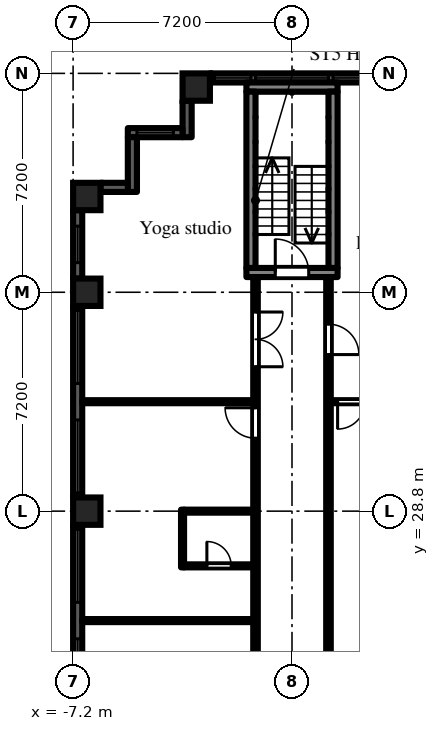
"""IFC4 building model, lengths in metres.
Left out: names, types, materials, properties, quantities, classifications, styles, units other than length and angle.
Written with IfcOpenShell. Run it as: python <this file> out.ifc"""

import sys

from ifc_helpers import new_model, si_unit, direction, frame, frame_2d, origin, origin_2d, place, context, subcontext, project, spatial, rectangle, extrude, element, fill, save


model = new_model("IFC4")
c1 = context("Model", 3, precision=1e-05, world=origin(), true_north=direction((0.0, 1.0)))
c2 = subcontext(c1, "Body", "Model", "MODEL_VIEW")
j1 = project(units=[si_unit("LENGTHUNIT", "METRE"), si_unit("PLANEANGLEUNIT", "RADIAN")], contexts=[c1])
p1 = place(None, origin())
s1 = spatial("IfcSite", under=j1, at=p1, CompositionType="ELEMENT")
p2 = place(p1, origin())
s2 = spatial("IfcBuilding", under=s1, at=p2, CompositionType="ELEMENT")
p3 = place(p2, frame((0.0, 0.0, 53.7)))
s3 = spatial("IfcBuildingStorey", under=s2, at=p3, CompositionType="ELEMENT", Elevation=53.7)
for number, where, z_axis, x_axis in (
    (1, (-6.75, 28.8, 0.0), (0.0, 0.0, 1.0), (1.0, 0.0, 0.0)),
    (2, (-6.75, 36.0, 0.0), (0.0, 0.0, 1.0), (1.0, 0.0, 0.0)),
    (3, (-6.75, 39.15, 0.0), (0.0, 0.0, 1.0), (1.0, 0.0, 0.0)),
    (4, (-3.15, 42.75, 0.0), (0.0, 0.0, 1.0), (1.0, 0.0, 0.0)),
):
    element("IfcColumn", number, at=place(p3, frame(where, z_axis=z_axis, x_axis=x_axis)), inside=s3, PredefinedType="COLUMN", context=c2, shape_type="SweptSolid", body=[
        extrude(rectangle(XDim=0.9, YDim=0.9, at=origin_2d()), origin(), (0.0, 0.0, 1.0), 3.0),
    ])
p4 = place(p3, frame((2.7, 43.05, 0.0), z_axis=(0.0, 0.0, 1.0), x_axis=(-1.0, 0.0, 0.0)))
e5 = element("IfcWall", 5, at=p4, inside=s3, PredefinedType="SOLIDWALL", context=c2, shape_type="SweptSolid", body=[
    extrude(rectangle(XDim=5.4, YDim=0.3, at=frame_2d((2.7, 0.0))), origin(), (0.0, 0.0, 1.0), 2.1),
])
p5 = place(p4, frame((1.5, 0.0, 0.2)))
e6 = element("IfcOpeningElement", 6, at=p5, cuts=e5, PredefinedType="OPENING", context=c2, shape_type="SweptSolid", body=[
    extrude(rectangle(XDim=2.4, YDim=1.85, at=frame_2d((1.2, 0.925))), frame((0.0, 0.16, 0.0), z_axis=(0.0, -1.0, 0.0), x_axis=(1.0, 0.0, 0.0)), (0.0, 0.0, 1.0), 0.32),
])
p6 = place(p4, frame((0.15, 0.0, 0.2)))
e7 = element("IfcOpeningElement", 7, at=p6, cuts=e5, PredefinedType="OPENING", context=c2, shape_type="SweptSolid", body=[
    extrude(rectangle(XDim=1.2, YDim=1.85, at=frame_2d((0.6, 0.925))), frame((0.0, 0.16, 0.0), z_axis=(0.0, -1.0, 0.0), x_axis=(1.0, 0.0, 0.0)), (0.0, 0.0, 1.0), 0.32),
])
p7 = place(p4, frame((4.05, 0.0, 0.2)))
e8 = element("IfcOpeningElement", 8, at=p7, cuts=e5, PredefinedType="OPENING", context=c2, shape_type="SweptSolid", body=[
    extrude(rectangle(XDim=1.2, YDim=1.85, at=frame_2d((0.6, 0.925))), frame((0.0, 0.16, 0.0), z_axis=(0.0, -1.0, 0.0), x_axis=(1.0, 0.0, 0.0)), (0.0, 0.0, 1.0), 0.32),
])
p8 = place(p3, frame((-3.45, 42.3, 0.0), z_axis=(0.0, 0.0, 1.0), x_axis=(0.0, -1.0, 0.0)))
e9 = element("IfcWall", 9, at=p8, inside=s3, PredefinedType="SOLIDWALL", context=c2, shape_type="SweptSolid", body=[
    extrude(rectangle(XDim=1.2, YDim=0.3, at=frame_2d((0.6, 0.0))), origin(), (0.0, 0.0, 1.0), 2.575),
])
p9 = place(p3, frame((-3.6, 41.25, 0.0), z_axis=(0.0, 0.0, 1.0), x_axis=(-1.0, 0.0, 0.0)))
e10 = element("IfcWall", 10, at=p9, inside=s3, PredefinedType="SOLIDWALL", context=c2, shape_type="SweptSolid", body=[
    extrude(rectangle(XDim=1.8, YDim=0.3, at=frame_2d((0.9, 0.0))), origin(), (0.0, 0.0, 1.0), 2.575),
])
p10 = place(p9, frame((0.3, 0.0, 0.2)))
e11 = element("IfcOpeningElement", 11, at=p10, cuts=e10, PredefinedType="OPENING", context=c2, shape_type="SweptSolid", body=[
    extrude(rectangle(XDim=1.2, YDim=1.85, at=frame_2d((0.6, 0.925))), frame((0.0, 0.16, 0.0), z_axis=(0.0, -1.0, 0.0), x_axis=(1.0, 0.0, 0.0)), (0.0, 0.0, 1.0), 0.32),
])
p11 = place(p3, frame((-5.25, 41.1, 0.0), z_axis=(0.0, 0.0, 1.0), x_axis=(0.0, -1.0, 0.0)))
e12 = element("IfcWall", 12, at=p11, inside=s3, PredefinedType="SOLIDWALL", context=c2, shape_type="SweptSolid", body=[
    extrude(rectangle(XDim=1.8, YDim=0.3, at=frame_2d((0.9, 0.0))), origin(), (0.0, 0.0, 1.0), 2.575),
])
p12 = place(p3, frame((-5.4, 39.45, 0.0), z_axis=(0.0, 0.0, 1.0), x_axis=(-1.0, 0.0, 0.0)))
e13 = element("IfcWall", 13, at=p12, inside=s3, PredefinedType="SOLIDWALL", context=c2, shape_type="SweptSolid", body=[
    extrude(rectangle(XDim=0.9, YDim=0.3, at=frame_2d((0.45, 0.0))), origin(), (0.0, 0.0, 1.0), 2.575),
])
p13 = place(p3, frame((-7.05, 38.7, 0.0), z_axis=(0.0, 0.0, 1.0), x_axis=(0.0, -1.0, 0.0)))
e14 = element("IfcWall", 14, at=p13, inside=s3, PredefinedType="SOLIDWALL", context=c2, shape_type="SweptSolid", body=[
    extrude(rectangle(XDim=2.25, YDim=0.3, at=frame_2d((1.125, 0.0))), origin(), (0.0, 0.0, 1.0), 2.1),
])
p14 = place(p13, frame((0.525, 0.0, 0.2)))
e15 = element("IfcOpeningElement", 15, at=p14, cuts=e14, PredefinedType="OPENING", context=c2, shape_type="SweptSolid", body=[
    extrude(rectangle(XDim=1.2, YDim=1.85, at=frame_2d((0.6, 0.925))), frame((0.0, 0.16, 0.0), z_axis=(0.0, -1.0, 0.0), x_axis=(1.0, 0.0, 0.0)), (0.0, 0.0, 1.0), 0.32),
])
p15 = place(p3, frame((-7.05, 35.55, 0.0), z_axis=(0.0, 0.0, 1.0), x_axis=(0.0, -1.0, 0.0)))
e16 = element("IfcWall", 16, at=p15, inside=s3, PredefinedType="SOLIDWALL", context=c2, shape_type="SweptSolid", body=[
    extrude(rectangle(XDim=6.3, YDim=0.3, at=frame_2d((3.15, 0.0))), origin(), (0.0, 0.0, 1.0), 2.1),
])
p16 = place(p15, frame((0.15, 0.0, 0.2)))
e17 = element("IfcOpeningElement", 17, at=p16, cuts=e16, PredefinedType="OPENING", context=c2, shape_type="SweptSolid", body=[
    extrude(rectangle(XDim=2.4, YDim=1.85, at=frame_2d((1.2, 0.925))), frame((0.0, 0.16, 0.0), z_axis=(0.0, -1.0, 0.0), x_axis=(1.0, 0.0, 0.0)), (0.0, 0.0, 1.0), 0.32),
])
p17 = place(p15, frame((3.75, 0.0, 0.2)))
e18 = element("IfcOpeningElement", 18, at=p17, cuts=e16, PredefinedType="OPENING", context=c2, shape_type="SweptSolid", body=[
    extrude(rectangle(XDim=2.4, YDim=1.85, at=frame_2d((1.2, 0.925))), frame((0.0, 0.16, 0.0), z_axis=(0.0, -1.0, 0.0), x_axis=(1.0, 0.0, 0.0)), (0.0, 0.0, 1.0), 0.32),
])
p18 = place(p3, frame((-7.05, 28.35, 0.0), z_axis=(0.0, 0.0, 1.0), x_axis=(0.0, -1.0, 0.0)))
e19 = element("IfcWall", 19, at=p18, inside=s3, PredefinedType="SOLIDWALL", context=c2, shape_type="SweptSolid", body=[
    extrude(rectangle(XDim=6.3, YDim=0.3, at=frame_2d((3.15, 0.0))), origin(), (0.0, 0.0, 1.0), 2.1),
])
p19 = place(p18, frame((0.15, 0.0, 0.2)))
e20 = element("IfcOpeningElement", 20, at=p19, cuts=e19, PredefinedType="OPENING", context=c2, shape_type="SweptSolid", body=[
    extrude(rectangle(XDim=2.4, YDim=1.85, at=frame_2d((1.2, 0.925))), frame((0.0, 0.16, 0.0), z_axis=(0.0, -1.0, 0.0), x_axis=(1.0, 0.0, 0.0)), (0.0, 0.0, 1.0), 0.32),
])
p20 = place(p18, frame((3.75, 0.0, 0.2)))
e21 = element("IfcOpeningElement", 21, at=p20, cuts=e19, PredefinedType="OPENING", context=c2, shape_type="SweptSolid", body=[
    extrude(rectangle(XDim=2.4, YDim=1.85, at=frame_2d((1.2, 0.925))), frame((0.0, 0.16, 0.0), z_axis=(0.0, -1.0, 0.0), x_axis=(1.0, 0.0, 0.0)), (0.0, 0.0, 1.0), 0.32),
])
p21 = place(p3, frame((-1.5, 36.65, 0.0), z_axis=(0.0, 0.0, 1.0), x_axis=(1.0, 0.0, 0.0)))
e22 = element("IfcWall", 22, at=p21, inside=s3, PredefinedType="SHEAR", context=c2, shape_type="SweptSolid", body=[
    extrude(rectangle(XDim=3.0, YDim=0.3, at=frame_2d((1.5, 0.0))), origin(), (0.0, 0.0, 1.0), 2.575),
])
p22 = place(p21, frame((0.95, 0.0, 0.0)))
e23 = element("IfcOpeningElement", 23, at=p22, cuts=e22, PredefinedType="OPENING", context=c2, shape_type="SweptSolid", body=[
    extrude(rectangle(XDim=1.1, YDim=2.1, at=frame_2d((0.55, 1.05))), frame((0.0, 0.16, 0.0), z_axis=(0.0, -1.0, 0.0), x_axis=(1.0, 0.0, 0.0)), (0.0, 0.0, 1.0), 0.32),
])
p23 = place(p3, frame((-1.5, 42.75, 0.0), z_axis=(0.0, 0.0, 1.0), x_axis=(1.0, 0.0, 0.0)))
e24 = element("IfcWall", 24, at=p23, inside=s3, PredefinedType="SHEAR", context=c2, shape_type="SweptSolid", body=[
    extrude(rectangle(XDim=3.0, YDim=0.3, at=frame_2d((1.5, 0.0))), origin(), (0.0, 0.0, 1.0), 2.575),
])
for number, where, z_axis, x_axis in (
    (25, (-1.35, 36.8, 0.0), (0.0, 0.0, 1.0), (0.0, 1.0, 0.0)),
    (26, (1.35, 36.8, 0.0), (0.0, 0.0, 1.0), (0.0, 1.0, 0.0)),
):
    element("IfcWall", number, at=place(p3, frame(where, z_axis=z_axis, x_axis=x_axis)), inside=s3, PredefinedType="SHEAR", context=c2, shape_type="SweptSolid", body=[
        extrude(rectangle(XDim=5.8, YDim=0.3, at=frame_2d((2.9, 0.0))), origin(), (0.0, 0.0, 1.0), 2.575),
    ])
for number, where, z_axis, x_axis in (
    (27, (-6.9, 25.2, 0.0), (0.0, 0.0, 1.0), (1.0, 0.0, 0.0)),
    (28, (-6.9, 32.4, 0.0), (0.0, 0.0, 1.0), (1.0, 0.0, 0.0)),
):
    element("IfcWall", number, at=place(p3, frame(where, z_axis=z_axis, x_axis=x_axis)), inside=s3, PredefinedType="PARTITIONING", context=c2, shape_type="SweptSolid", body=[
        extrude(rectangle(XDim=5.625, YDim=0.1, at=frame_2d((2.812, 0.0))), origin(), (0.0, 0.0, 1.0), 2.575),
    ])
p24 = place(p3, frame((-3.6, 26.95, 0.0), z_axis=(0.0, 0.0, 1.0), x_axis=(0.0, 1.0, 0.0)))
e29 = element("IfcWall", 29, at=p24, inside=s3, PredefinedType="PARTITIONING", context=c2, shape_type="SweptSolid", body=[
    extrude(rectangle(XDim=1.9, YDim=0.1, at=frame_2d((0.95, 0.0))), origin(), (0.0, 0.0, 1.0), 2.575),
])
p25 = place(p3, frame((-3.55, 27.0, 0.0), z_axis=(0.0, 0.0, 1.0), x_axis=(1.0, 0.0, 0.0)))
e30 = element("IfcWall", 30, at=p25, inside=s3, PredefinedType="PARTITIONING", context=c2, shape_type="SweptSolid", body=[
    extrude(rectangle(XDim=2.275, YDim=0.1, at=frame_2d((1.138, 0.0))), origin(), (0.0, 0.0, 1.0), 2.575),
])
p26 = place(p25, frame((0.75, 0.0, 0.0)))
e31 = element("IfcOpeningElement", 31, at=p26, cuts=e30, PredefinedType="OPENING", context=c2, shape_type="SweptSolid", body=[
    extrude(rectangle(XDim=0.8, YDim=2.1, at=frame_2d((0.4, 1.05))), frame((0.0, 0.06, 0.0), z_axis=(0.0, -1.0, 0.0), x_axis=(1.0, 0.0, 0.0)), (0.0, 0.0, 1.0), 0.12),
])
p27 = place(p3, frame((-3.55, 28.8, 0.0), z_axis=(0.0, 0.0, 1.0), x_axis=(1.0, 0.0, 0.0)))
e32 = element("IfcWall", 32, at=p27, inside=s3, PredefinedType="PARTITIONING", context=c2, shape_type="SweptSolid", body=[
    extrude(rectangle(XDim=2.275, YDim=0.1, at=frame_2d((1.138, 0.0))), origin(), (0.0, 0.0, 1.0), 2.575),
])
p28 = place(p3, frame((-1.2, 1.275, 0.0), z_axis=(0.0, 0.0, 1.0), x_axis=(0.0, 1.0, 0.0)))
e33 = element("IfcWall", 33, at=p28, inside=s3, PredefinedType="PARTITIONING", context=c2, shape_type="SweptSolid", body=[
    extrude(rectangle(XDim=35.225, YDim=0.15, at=frame_2d((17.613, 0.0))), origin(), (0.0, 0.0, 1.0), 2.575),
])
p29 = place(p28, frame((2.475, 0.0, 0.0)))
e34 = element("IfcOpeningElement", 34, at=p29, cuts=e33, PredefinedType="OPENING", context=c2, shape_type="SweptSolid", body=[
    extrude(rectangle(XDim=0.9, YDim=2.1, at=frame_2d((0.45, 1.05))), frame((0.0, 0.085, 0.0), z_axis=(0.0, -1.0, 0.0), x_axis=(1.0, 0.0, 0.0)), (0.0, 0.0, 1.0), 0.17),
])
p30 = place(p28, frame((11.275, 0.0, 0.0)))
e35 = element("IfcOpeningElement", 35, at=p30, cuts=e33, PredefinedType="OPENING", context=c2, shape_type="SweptSolid", body=[
    extrude(rectangle(XDim=0.9, YDim=2.1, at=frame_2d((0.45, 1.05))), frame((0.0, 0.085, 0.0), z_axis=(0.0, -1.0, 0.0), x_axis=(1.0, 0.0, 0.0)), (0.0, 0.0, 1.0), 0.17),
])
p31 = place(p28, frame((7.675, 0.0, 0.0)))
e36 = element("IfcOpeningElement", 36, at=p31, cuts=e33, PredefinedType="OPENING", context=c2, shape_type="SweptSolid", body=[
    extrude(rectangle(XDim=0.9, YDim=2.1, at=frame_2d((0.45, 1.05))), frame((0.0, 0.085, 0.0), z_axis=(0.0, -1.0, 0.0), x_axis=(1.0, 0.0, 0.0)), (0.0, 0.0, 1.0), 0.17),
])
p32 = place(p28, frame((19.125, 0.0, 0.0)))
e37 = element("IfcOpeningElement", 37, at=p32, cuts=e33, PredefinedType="OPENING", context=c2, shape_type="SweptSolid", body=[
    extrude(rectangle(XDim=1.0, YDim=2.1, at=frame_2d((0.5, 1.05))), frame((0.0, 0.085, 0.0), z_axis=(0.0, -1.0, 0.0), x_axis=(1.0, 0.0, 0.0)), (0.0, 0.0, 1.0), 0.17),
])
p33 = place(p28, frame((21.675, 0.0, 0.0)))
e38 = element("IfcOpeningElement", 38, at=p33, cuts=e33, PredefinedType="OPENING", context=c2, shape_type="SweptSolid", body=[
    extrude(rectangle(XDim=0.9, YDim=2.1, at=frame_2d((0.45, 1.05))), frame((0.0, 0.085, 0.0), z_axis=(0.0, -1.0, 0.0), x_axis=(1.0, 0.0, 0.0)), (0.0, 0.0, 1.0), 0.17),
])
p34 = place(p28, frame((29.925, 0.0, 0.0)))
e39 = element("IfcOpeningElement", 39, at=p34, cuts=e33, PredefinedType="OPENING", context=c2, shape_type="SweptSolid", body=[
    extrude(rectangle(XDim=1.0, YDim=2.1, at=frame_2d((0.5, 1.05))), frame((0.0, 0.085, 0.0), z_axis=(0.0, -1.0, 0.0), x_axis=(1.0, 0.0, 0.0)), (0.0, 0.0, 1.0), 0.17),
])
p35 = place(p28, frame((32.275, 0.0, 0.0)))
e40 = element("IfcOpeningElement", 40, at=p35, cuts=e33, PredefinedType="OPENING", context=c2, shape_type="SweptSolid", body=[
    extrude(rectangle(XDim=1.8, YDim=2.1, at=frame_2d((0.9, 1.05))), frame((0.0, 0.085, 0.0), z_axis=(0.0, -1.0, 0.0), x_axis=(1.0, 0.0, 0.0)), (0.0, 0.0, 1.0), 0.17),
])
p36 = place(p3, frame((1.2, 1.125, 0.0), z_axis=(0.0, 0.0, 1.0), x_axis=(0.0, 1.0, 0.0)))
e41 = element("IfcWall", 41, at=p36, inside=s3, PredefinedType="PARTITIONING", context=c2, shape_type="SweptSolid", body=[
    extrude(rectangle(XDim=35.375, YDim=0.15, at=frame_2d((17.688, 0.0))), origin(), (0.0, 0.0, 1.0), 2.575),
])
p37 = place(p36, frame((2.625, 0.0, 0.0)))
e42 = element("IfcOpeningElement", 42, at=p37, cuts=e41, PredefinedType="OPENING", context=c2, shape_type="SweptSolid", body=[
    extrude(rectangle(XDim=0.9, YDim=2.1, at=frame_2d((0.45, 1.05))), frame((0.0, 0.085, 0.0), z_axis=(0.0, -1.0, 0.0), x_axis=(1.0, 0.0, 0.0)), (0.0, 0.0, 1.0), 0.17),
])
p38 = place(p36, frame((7.425, 0.0, 0.0)))
e43 = element("IfcOpeningElement", 43, at=p38, cuts=e41, PredefinedType="OPENING", context=c2, shape_type="SweptSolid", body=[
    extrude(rectangle(XDim=0.9, YDim=2.1, at=frame_2d((0.45, 1.05))), frame((0.0, 0.085, 0.0), z_axis=(0.0, -1.0, 0.0), x_axis=(1.0, 0.0, 0.0)), (0.0, 0.0, 1.0), 0.17),
])
p39 = place(p36, frame((13.725, 0.0, 0.0)))
e44 = element("IfcOpeningElement", 44, at=p39, cuts=e41, PredefinedType="OPENING", context=c2, shape_type="SweptSolid", body=[
    extrude(rectangle(XDim=0.9, YDim=2.1, at=frame_2d((0.45, 1.05))), frame((0.0, 0.085, 0.0), z_axis=(0.0, -1.0, 0.0), x_axis=(1.0, 0.0, 0.0)), (0.0, 0.0, 1.0), 0.17),
])
p40 = place(p36, frame((15.525, 0.0, 0.0)))
e45 = element("IfcOpeningElement", 45, at=p40, cuts=e41, PredefinedType="OPENING", context=c2, shape_type="SweptSolid", body=[
    extrude(rectangle(XDim=0.9, YDim=2.1, at=frame_2d((0.45, 1.05))), frame((0.0, 0.085, 0.0), z_axis=(0.0, -1.0, 0.0), x_axis=(1.0, 0.0, 0.0)), (0.0, 0.0, 1.0), 0.17),
])
p41 = place(p36, frame((32.825, 0.0, 0.0)))
e46 = element("IfcOpeningElement", 46, at=p41, cuts=e41, PredefinedType="OPENING", context=c2, shape_type="SweptSolid", body=[
    extrude(rectangle(XDim=1.0, YDim=2.1, at=frame_2d((0.5, 1.05))), frame((0.0, 0.085, 0.0), z_axis=(0.0, -1.0, 0.0), x_axis=(1.0, 0.0, 0.0)), (0.0, 0.0, 1.0), 0.17),
])
p42 = place(p3, frame((1.275, 32.4, 0.0), z_axis=(0.0, 0.0, 1.0), x_axis=(1.0, 0.0, 0.0)))
e47 = element("IfcWall", 47, at=p42, inside=s3, PredefinedType="PARTITIONING", context=c2, shape_type="SweptSolid", body=[
    extrude(rectangle(XDim=5.625, YDim=0.1, at=frame_2d((2.812, 0.0))), origin(), (0.0, 0.0, 1.0), 2.575),
])
p43 = place(p42, frame((0.225, 0.0, 0.0)))
e48 = element("IfcOpeningElement", 48, at=p43, cuts=e47, PredefinedType="OPENING", context=c2, shape_type="SweptSolid", body=[
    extrude(rectangle(XDim=0.9, YDim=2.1, at=frame_2d((0.45, 1.05))), frame((0.0, 0.06, 0.0), z_axis=(0.0, -1.0, 0.0), x_axis=(1.0, 0.0, 0.0)), (0.0, 0.0, 1.0), 0.12),
])
p44 = place(p5, origin())
e49 = element("IfcWindow", 49, at=p44, inside=s3, PartitioningType="SINGLE_PANEL", PredefinedType="WINDOW", context=c2, shape_type="SweptSolid", body=[
    extrude(rectangle(XDim=2.4, YDim=1.85, at=frame_2d((1.2, 0.925))), frame((0.0, 0.03, 0.0), z_axis=(0.0, -1.0, 0.0), x_axis=(1.0, 0.0, 0.0)), (0.0, 0.0, 1.0), 0.06),
])
fill(e6, e49)
p45 = place(p6, origin())
e50 = element("IfcWindow", 50, at=p45, inside=s3, PartitioningType="SINGLE_PANEL", PredefinedType="WINDOW", context=c2, shape_type="SweptSolid", body=[
    extrude(rectangle(XDim=1.2, YDim=1.85, at=frame_2d((0.6, 0.925))), frame((0.0, 0.03, 0.0), z_axis=(0.0, -1.0, 0.0), x_axis=(1.0, 0.0, 0.0)), (0.0, 0.0, 1.0), 0.06),
])
fill(e7, e50)
p46 = place(p7, origin())
e51 = element("IfcWindow", 51, at=p46, inside=s3, PartitioningType="SINGLE_PANEL", PredefinedType="WINDOW", context=c2, shape_type="SweptSolid", body=[
    extrude(rectangle(XDim=1.2, YDim=1.85, at=frame_2d((0.6, 0.925))), frame((0.0, 0.03, 0.0), z_axis=(0.0, -1.0, 0.0), x_axis=(1.0, 0.0, 0.0)), (0.0, 0.0, 1.0), 0.06),
])
fill(e8, e51)
p47 = place(p10, origin())
e52 = element("IfcWindow", 52, at=p47, inside=s3, PartitioningType="SINGLE_PANEL", PredefinedType="WINDOW", context=c2, shape_type="SweptSolid", body=[
    extrude(rectangle(XDim=1.2, YDim=1.85, at=frame_2d((0.6, 0.925))), frame((0.0, 0.03, 0.0), z_axis=(0.0, -1.0, 0.0), x_axis=(1.0, 0.0, 0.0)), (0.0, 0.0, 1.0), 0.06),
])
fill(e11, e52)
p48 = place(p14, origin())
e53 = element("IfcWindow", 53, at=p48, inside=s3, PartitioningType="SINGLE_PANEL", PredefinedType="WINDOW", context=c2, shape_type="SweptSolid", body=[
    extrude(rectangle(XDim=1.2, YDim=1.85, at=frame_2d((0.6, 0.925))), frame((0.0, 0.03, 0.0), z_axis=(0.0, -1.0, 0.0), x_axis=(1.0, 0.0, 0.0)), (0.0, 0.0, 1.0), 0.06),
])
fill(e15, e53)
p49 = place(p16, origin())
e54 = element("IfcWindow", 54, at=p49, inside=s3, PartitioningType="SINGLE_PANEL", PredefinedType="WINDOW", context=c2, shape_type="SweptSolid", body=[
    extrude(rectangle(XDim=2.4, YDim=1.85, at=frame_2d((1.2, 0.925))), frame((0.0, 0.03, 0.0), z_axis=(0.0, -1.0, 0.0), x_axis=(1.0, 0.0, 0.0)), (0.0, 0.0, 1.0), 0.06),
])
fill(e17, e54)
p50 = place(p17, origin())
e55 = element("IfcWindow", 55, at=p50, inside=s3, PartitioningType="SINGLE_PANEL", PredefinedType="WINDOW", context=c2, shape_type="SweptSolid", body=[
    extrude(rectangle(XDim=2.4, YDim=1.85, at=frame_2d((1.2, 0.925))), frame((0.0, 0.03, 0.0), z_axis=(0.0, -1.0, 0.0), x_axis=(1.0, 0.0, 0.0)), (0.0, 0.0, 1.0), 0.06),
])
fill(e18, e55)
p51 = place(p19, origin())
e56 = element("IfcWindow", 56, at=p51, inside=s3, PartitioningType="SINGLE_PANEL", PredefinedType="WINDOW", context=c2, shape_type="SweptSolid", body=[
    extrude(rectangle(XDim=2.4, YDim=1.85, at=frame_2d((1.2, 0.925))), frame((0.0, 0.03, 0.0), z_axis=(0.0, -1.0, 0.0), x_axis=(1.0, 0.0, 0.0)), (0.0, 0.0, 1.0), 0.06),
])
fill(e20, e56)
p52 = place(p20, origin())
e57 = element("IfcWindow", 57, at=p52, inside=s3, PartitioningType="SINGLE_PANEL", PredefinedType="WINDOW", context=c2, shape_type="SweptSolid", body=[
    extrude(rectangle(XDim=2.4, YDim=1.85, at=frame_2d((1.2, 0.925))), frame((0.0, 0.03, 0.0), z_axis=(0.0, -1.0, 0.0), x_axis=(1.0, 0.0, 0.0)), (0.0, 0.0, 1.0), 0.06),
])
fill(e21, e57)
p53 = place(p22, origin())
e58 = element("IfcDoor", 58, at=p53, inside=s3, OperationType="SINGLE_SWING_LEFT", PredefinedType="DOOR", context=c2, shape_type="SweptSolid", body=[
    extrude(rectangle(XDim=1.1, YDim=2.1, at=frame_2d((0.55, 1.05))), frame((0.0, 0.025, 0.0), z_axis=(0.0, -1.0, 0.0), x_axis=(1.0, 0.0, 0.0)), (0.0, 0.0, 1.0), 0.05),
])
fill(e23, e58)
p54 = place(p26, origin())
e59 = element("IfcDoor", 59, at=p54, inside=s3, OperationType="SINGLE_SWING_LEFT", PredefinedType="DOOR", context=c2, shape_type="SweptSolid", body=[
    extrude(rectangle(XDim=0.8, YDim=2.1, at=frame_2d((0.4, 1.05))), frame((0.0, 0.025, 0.0), z_axis=(0.0, -1.0, 0.0), x_axis=(1.0, 0.0, 0.0)), (0.0, 0.0, 1.0), 0.05),
])
fill(e31, e59)
p55 = place(p34, origin())
e60 = element("IfcDoor", 60, at=p55, inside=s3, OperationType="SINGLE_SWING_RIGHT", PredefinedType="DOOR", context=c2, shape_type="SweptSolid", body=[
    extrude(rectangle(XDim=1.0, YDim=2.1, at=frame_2d((0.5, 1.05))), frame((0.0, 0.025, 0.0), z_axis=(0.0, -1.0, 0.0), x_axis=(1.0, 0.0, 0.0)), (0.0, 0.0, 1.0), 0.05),
])
fill(e39, e60)
p56 = place(p35, frame((1.8, 0.0, 0.0), z_axis=(0.0, 0.0, 1.0), x_axis=(-1.0, 0.0, 0.0)))
e61 = element("IfcDoor", 61, at=p56, inside=s3, OperationType="DOUBLE_DOOR_DOUBLE_SWING", PredefinedType="DOOR", context=c2, shape_type="SweptSolid", body=[
    extrude(rectangle(XDim=1.8, YDim=2.1, at=frame_2d((0.9, 1.05))), frame((0.0, 0.025, 0.0), z_axis=(0.0, -1.0, 0.0), x_axis=(1.0, 0.0, 0.0)), (0.0, 0.0, 1.0), 0.05),
])
fill(e40, e61)
p57 = place(p41, frame((1.0, 0.0, 0.0), z_axis=(0.0, 0.0, 1.0), x_axis=(-1.0, 0.0, 0.0)))
e62 = element("IfcDoor", 62, at=p57, inside=s3, OperationType="SINGLE_SWING_RIGHT", PredefinedType="DOOR", context=c2, shape_type="SweptSolid", body=[
    extrude(rectangle(XDim=1.0, YDim=2.1, at=frame_2d((0.5, 1.05))), frame((0.0, 0.025, 0.0), z_axis=(0.0, -1.0, 0.0), x_axis=(1.0, 0.0, 0.0)), (0.0, 0.0, 1.0), 0.05),
])
fill(e46, e62)
p58 = place(p43, frame((0.9, 0.0, 0.0), z_axis=(0.0, 0.0, 1.0), x_axis=(-1.0, 0.0, 0.0)))
e63 = element("IfcDoor", 63, at=p58, inside=s3, OperationType="SINGLE_SWING_RIGHT", PredefinedType="DOOR", context=c2, shape_type="SweptSolid", body=[
    extrude(rectangle(XDim=0.9, YDim=2.1, at=frame_2d((0.45, 1.05))), frame((0.0, 0.025, 0.0), z_axis=(0.0, -1.0, 0.0), x_axis=(1.0, 0.0, 0.0)), (0.0, 0.0, 1.0), 0.05),
])
fill(e48, e63)
save(model, sys.argv[1])
